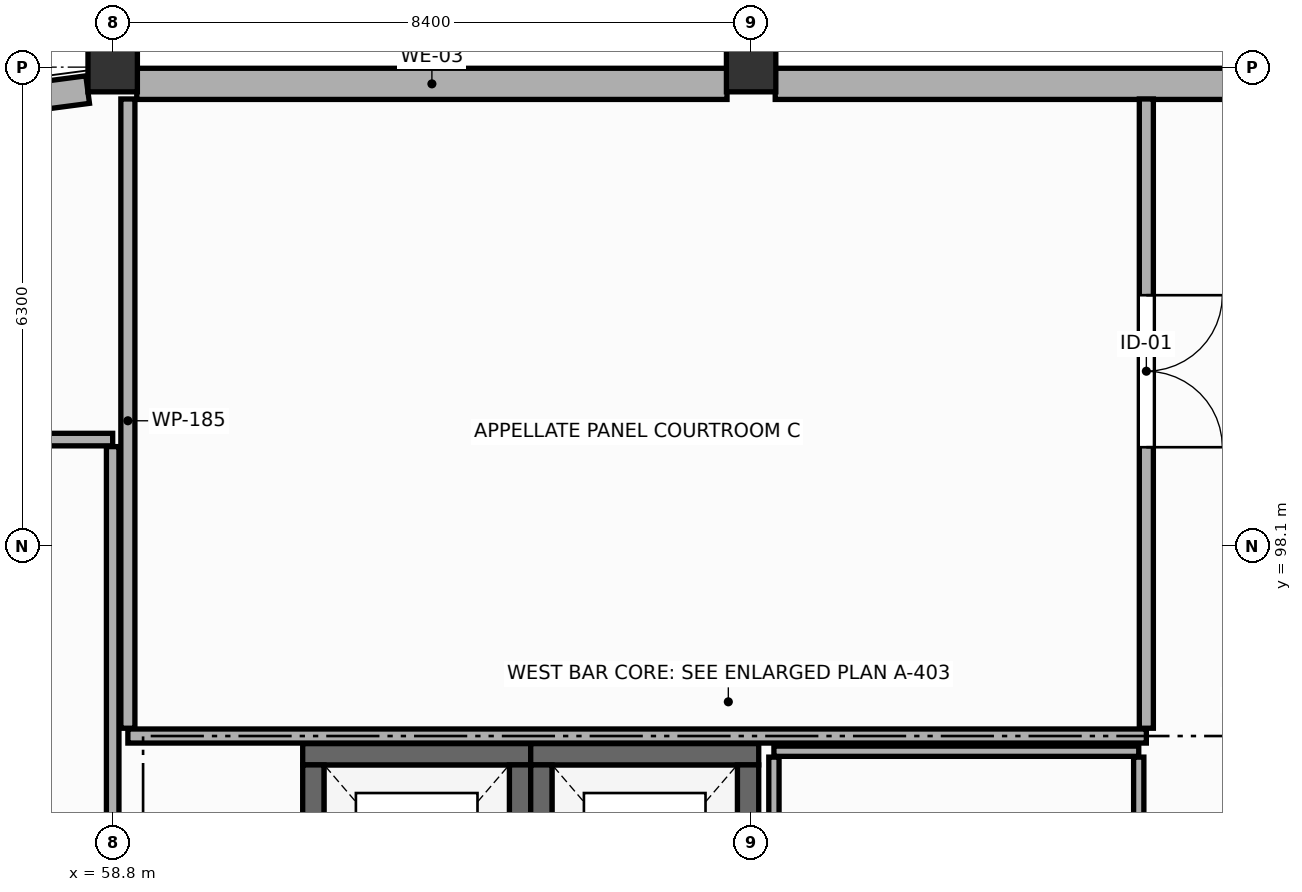
"""IFC4 building model, lengths in metres.
Left out: names, types, materials, properties, quantities, classifications, styles, units other than length and angle.
Written with IfcOpenShell. Run it as: python <this file> out.ifc"""

import sys

from ifc_helpers import new_model, si_unit, direction, frame, frame_2d, origin, origin_2d, place, context, subcontext, project, spatial, rectangle, extrude, element, fill, save


model = new_model("IFC4")
c1 = context("Model", 3, precision=1e-05, world=origin(), true_north=direction((0.0, 1.0)))
c2 = subcontext(c1, "Body", "Model", "MODEL_VIEW")
j1 = project(units=[si_unit("LENGTHUNIT", "METRE"), si_unit("PLANEANGLEUNIT", "RADIAN")], contexts=[c1])
p1 = place(None, origin())
s1 = spatial("IfcSite", under=j1, at=p1, CompositionType="ELEMENT")
p2 = place(p1, origin())
s2 = spatial("IfcBuilding", under=s1, at=p2, CompositionType="ELEMENT")
p3 = place(p2, frame((0.0, 0.0, 18.6)))
s3 = spatial("IfcBuildingStorey", under=s2, at=p3, CompositionType="ELEMENT", Elevation=18.6)
for number, where, z_axis, x_axis in (
    (1, (58.8, 104.4, 0.0), (0.0, 0.0, 1.0), (1.0, 0.0, 0.0)),
    (2, (67.2, 104.4, 0.0), (0.0, 0.0, 1.0), (1.0, 0.0, 0.0)),
):
    element("IfcColumn", number, at=place(p3, frame(where, z_axis=z_axis, x_axis=x_axis)), inside=s3, PredefinedType="COLUMN", context=c2, shape_type="SweptSolid", body=[
        extrude(rectangle(XDim=0.65, YDim=0.65, at=origin_2d()), origin(), (0.0, 0.0, 1.0), 4.2),
    ])
p4 = place(p3, frame((59.117, 104.18, 0.0), z_axis=(0.0, 0.0, 1.0), x_axis=(1.0, 0.0, 0.0)))
e3 = element("IfcWall", 3, at=p4, inside=s3, PredefinedType="STANDARD", context=c2, shape_type="SweptSolid", body=[
    extrude(rectangle(XDim=7.766, YDim=0.41, at=frame_2d((3.883, 0.0))), origin(), (0.0, 0.0, 1.0), 2.49),
])
p5 = place(p3, frame((67.517, 104.18, 0.0), z_axis=(0.0, 0.0, 1.0), x_axis=(1.0, 0.0, 0.0)))
e4 = element("IfcWall", 4, at=p5, inside=s3, PredefinedType="STANDARD", context=c2, shape_type="SweptSolid", body=[
    extrude(rectangle(XDim=7.766, YDim=0.41, at=frame_2d((3.883, 0.0))), origin(), (0.0, 0.0, 1.0), 2.49),
])
p6 = place(p3, frame((58.471, 104.104, 0.0), z_axis=(0.0, 0.0, 1.0), x_axis=(-0.99144889538, -0.13049554724, 0.0)))
e5 = element("IfcWall", 5, at=p6, inside=s3, PredefinedType="ELEMENTEDWALL", context=c2, shape_type="SweptSolid", body=[
    extrude(rectangle(XDim=2.924, YDim=0.365, at=frame_2d((1.462, 0.0))), origin(), (0.0, 0.0, 1.0), 3.09),
])
p7 = place(p6, frame((1.062, 0.0, 0.85)))
e6 = element("IfcOpeningElement", 6, at=p7, cuts=e5, PredefinedType="OPENING", context=c2, shape_type="SweptSolid", body=[
    extrude(rectangle(XDim=0.8, YDim=1.7, at=frame_2d((0.4, 0.85))), frame((0.0, 0.192, 0.0), z_axis=(0.0, -1.0, 0.0), x_axis=(1.0, 0.0, 0.0)), (0.0, 0.0, 1.0), 0.385),
])
p8 = place(p3, frame((61.3, 95.36, 0.0), z_axis=(0.0, 0.0, 1.0), x_axis=(1.0, 0.0, 0.0)))
e7 = element("IfcWall", 7, at=p8, inside=s3, PredefinedType="SHEAR", context=c2, shape_type="SweptSolid", body=[
    extrude(rectangle(XDim=3.0, YDim=0.28, at=frame_2d((1.5, 0.0))), origin(), (0.0, 0.0, 1.0), 3.96),
])
for number, where, z_axis, x_axis in (
    (8, (61.44, 92.38, 0.0), (0.0, 0.0, 1.0), (0.0, 1.0, 0.0)),
    (9, (64.16, 95.22, 0.0), (0.0, 0.0, 1.0), (0.0, -1.0, 0.0)),
):
    element("IfcWall", number, at=place(p3, frame(where, z_axis=z_axis, x_axis=x_axis)), inside=s3, PredefinedType="SHEAR", context=c2, shape_type="SweptSolid", body=[
        extrude(rectangle(XDim=2.84, YDim=0.28, at=frame_2d((1.42, 0.0))), origin(), (0.0, 0.0, 1.0), 3.96),
    ])
p9 = place(p3, frame((64.3, 95.36, 0.0), z_axis=(0.0, 0.0, 1.0), x_axis=(1.0, 0.0, 0.0)))
e10 = element("IfcWall", 10, at=p9, inside=s3, PredefinedType="SHEAR", context=c2, shape_type="SweptSolid", body=[
    extrude(rectangle(XDim=3.0, YDim=0.28, at=frame_2d((1.5, 0.0))), origin(), (0.0, 0.0, 1.0), 3.96),
])
for number, where, z_axis, x_axis in (
    (11, (64.44, 92.38, 0.0), (0.0, 0.0, 1.0), (0.0, 1.0, 0.0)),
    (12, (67.16, 95.22, 0.0), (0.0, 0.0, 1.0), (0.0, -1.0, 0.0)),
):
    element("IfcWall", number, at=place(p3, frame(where, z_axis=z_axis, x_axis=x_axis)), inside=s3, PredefinedType="SHEAR", context=c2, shape_type="SweptSolid", body=[
        extrude(rectangle(XDim=2.84, YDim=0.28, at=frame_2d((1.42, 0.0))), origin(), (0.0, 0.0, 1.0), 3.96),
    ])
p10 = place(p3, frame((72.4, 95.6, 0.0), z_axis=(0.0, 0.0, 1.0), x_axis=(-1.0, 0.0, 0.0)))
e13 = element("IfcWall", 13, at=p10, inside=s3, PredefinedType="PARTITIONING", context=c2, shape_type="SweptSolid", body=[
    extrude(rectangle(XDim=13.4, YDim=0.185, at=frame_2d((6.7, 0.0))), origin(), (0.0, 0.0, 1.0), 2.49),
])
p11 = place(p3, frame((59.0, 95.702, 0.0), z_axis=(0.0, 0.0, 1.0), x_axis=(0.0, 1.0, 0.0)))
e14 = element("IfcWall", 14, at=p11, inside=s3, PredefinedType="PARTITIONING", context=c2, shape_type="SweptSolid", body=[
    extrude(rectangle(XDim=8.279, YDim=0.185, at=frame_2d((4.139, 0.0))), origin(), (0.0, 0.0, 1.0), 3.09),
])
p12 = place(p3, frame((72.4, 103.981, 0.0), z_axis=(0.0, 0.0, 1.0), x_axis=(0.0, -1.0, 0.0)))
e15 = element("IfcWall", 15, at=p12, inside=s3, PredefinedType="PARTITIONING", context=c2, shape_type="SweptSolid", body=[
    extrude(rectangle(XDim=8.279, YDim=0.185, at=frame_2d((4.139, 0.0))), origin(), (0.0, 0.0, 1.0), 3.34),
])
p13 = place(p12, frame((2.581, 0.0, 0.0)))
e16 = element("IfcOpeningElement", 16, at=p13, cuts=e15, PredefinedType="OPENING", context=c2, shape_type="SweptSolid", body=[
    extrude(rectangle(XDim=2.0, YDim=2.5, at=frame_2d((1.0, 1.25))), frame((0.0, 0.103, 0.0), z_axis=(0.0, -1.0, 0.0), x_axis=(1.0, 0.0, 0.0)), (0.0, 0.0, 1.0), 0.205),
])
p14 = place(p3, frame((67.5, 95.4, 0.0), z_axis=(0.0, 0.0, 1.0), x_axis=(1.0, 0.0, 0.0)))
e17 = element("IfcWall", 17, at=p14, inside=s3, PredefinedType="PARTITIONING", context=c2, shape_type="SweptSolid", body=[
    extrude(rectangle(XDim=4.8, YDim=0.135, at=frame_2d((2.4, 0.0))), origin(), (0.0, 0.0, 1.0), 2.49),
])
p15 = place(p3, frame((67.5, 92.028, 0.0), z_axis=(0.0, 0.0, 1.0), x_axis=(0.0, 1.0, 0.0)))
e18 = element("IfcWall", 18, at=p15, inside=s3, PredefinedType="PARTITIONING", context=c2, shape_type="SweptSolid", body=[
    extrude(rectangle(XDim=3.295, YDim=0.135, at=frame_2d((1.647, 0.0))), origin(), (0.0, 0.0, 1.0), 2.44),
])
p16 = place(p3, frame((72.3, 95.323, 0.0), z_axis=(0.0, 0.0, 1.0), x_axis=(0.0, -1.0, 0.0)))
e19 = element("IfcWall", 19, at=p16, inside=s3, PredefinedType="PARTITIONING", context=c2, shape_type="SweptSolid", body=[
    extrude(rectangle(XDim=3.295, YDim=0.135, at=frame_2d((1.647, 0.0))), origin(), (0.0, 0.0, 1.0), 3.39),
])
p17 = place(p3, frame((49.3, 99.5, 0.0), z_axis=(0.0, 0.0, 1.0), x_axis=(1.0, 0.0, 0.0)))
e20 = element("IfcWall", 20, at=p17, inside=s3, PredefinedType="PARTITIONING", context=c2, shape_type="SweptSolid", body=[
    extrude(rectangle(XDim=9.5, YDim=0.165, at=frame_2d((4.75, 0.0))), origin(), (0.0, 0.0, 1.0), 2.99),
])
p18 = place(p3, frame((58.8, 99.407, 0.0), z_axis=(0.0, 0.0, 1.0), x_axis=(0.0, -1.0, 0.0)))
e21 = element("IfcWall", 21, at=p18, inside=s3, PredefinedType="PARTITIONING", context=c2, shape_type="SweptSolid", body=[
    extrude(rectangle(XDim=7.365, YDim=0.165, at=frame_2d((3.683, 0.0))), origin(), (0.0, 0.0, 1.0), 3.09),
])
p19 = place(p13, origin())
e22 = element("IfcDoor", 22, at=p19, inside=s3, OperationType="DOUBLE_DOOR_SINGLE_SWING", PredefinedType="DOOR", context=c2, shape_type="SweptSolid", body=[
    extrude(rectangle(XDim=2.0, YDim=2.5, at=frame_2d((1.0, 1.25))), frame((0.0, 0.025, 0.0), z_axis=(0.0, -1.0, 0.0), x_axis=(1.0, 0.0, 0.0)), (0.0, 0.0, 1.0), 0.05),
])
fill(e16, e22)
save(model, sys.argv[1])
